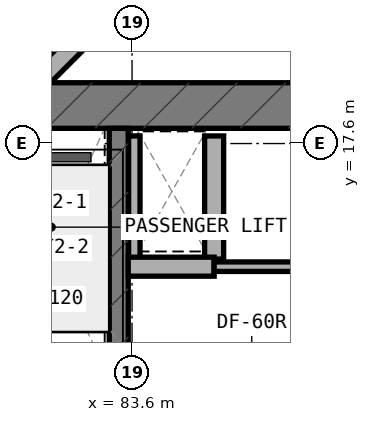
"""IFC4 building model, lengths in metres.
Left out: names, types, materials, properties, quantities, classifications, styles, units other than length and angle.
Written with IfcOpenShell. Run it as: python <this file> out.ifc"""

import sys

from ifc_helpers import new_model, si_unit, direction, frame, frame_2d, origin, place, context, subcontext, project, spatial, rectangle, extrude, element, save


model = new_model("IFC4")
c1 = context("Model", 3, precision=1e-05, world=origin(), true_north=direction((0.0, 1.0)))
c2 = subcontext(c1, "Body", "Model", "MODEL_VIEW")
j1 = project(units=[si_unit("LENGTHUNIT", "METRE"), si_unit("PLANEANGLEUNIT", "RADIAN")], contexts=[c1])
p1 = place(None, origin())
s1 = spatial("IfcSite", under=j1, at=p1, CompositionType="ELEMENT")
p2 = place(p1, origin())
s2 = spatial("IfcBuilding", under=s1, at=p2, CompositionType="ELEMENT")
p3 = place(p2, frame((0.0, 0.0, 41.5)))
s3 = spatial("IfcBuildingStorey", under=s2, at=p3, CompositionType="ELEMENT", Elevation=41.5)
p4 = place(p3, frame((67.8, 18.1, 0.0), z_axis=(0.0, 0.0, 1.0), x_axis=(1.0, 0.0, 0.0)))
e1 = element("IfcWall", 1, at=p4, inside=s3, PredefinedType="SHEAR", context=c2, shape_type="SweptSolid", body=[
    extrude(rectangle(XDim=18.6, YDim=0.6, at=frame_2d((9.3, 0.0))), origin(), (0.0, 0.0, 1.0), 3.5),
])
p5 = place(p3, frame((83.425, 14.64, 0.0), z_axis=(0.0, 0.0, 1.0), x_axis=(0.0, 1.0, 0.0)))
e2 = element("IfcWall", 2, at=p5, inside=s3, PredefinedType="STANDARD", context=c2, shape_type="SweptSolid", body=[
    extrude(rectangle(XDim=3.16, YDim=0.25, at=frame_2d((1.58, 0.0))), origin(), (0.0, 0.0, 1.0), 3.25),
])
p6 = place(p3, frame((82.082, 18.138, 0.0), z_axis=(0.0, 0.0, 1.0), x_axis=(0.707106781187, 0.707106781187, 0.0)))
e3 = element("IfcWall", 3, at=p6, inside=s3, PredefinedType="STANDARD", context=c2, shape_type="SweptSolid", body=[
    extrude(rectangle(XDim=2.311, YDim=0.26, at=frame_2d((1.155, 0.0))), origin(), (0.0, 0.0, 1.0), 3.25),
])
p7 = place(p3, frame((83.63, 16.08, 0.0), z_axis=(0.0, 0.0, 1.0), x_axis=(0.0, 1.0, 0.0)))
e4 = element("IfcWall", 4, at=p7, inside=s3, PredefinedType="PARTITIONING", context=c2, shape_type="SweptSolid", body=[
    extrude(rectangle(XDim=1.62, YDim=0.15, at=frame_2d((0.81, 0.0))), origin(), (0.0, 0.0, 1.0), 2.725),
])
p8 = place(p3, frame((84.68, 16.08, 0.0), z_axis=(0.0, 0.0, 1.0), x_axis=(0.0, 1.0, 0.0)))
e5 = element("IfcWall", 5, at=p8, inside=s3, PredefinedType="SOLIDWALL", context=c2, shape_type="SweptSolid", body=[
    extrude(rectangle(XDim=1.62, YDim=0.25, at=frame_2d((0.81, 0.0))), origin(), (0.0, 0.0, 1.0), 3.22),
])
p9 = place(p3, frame((83.55, 15.98, 0.0), z_axis=(0.0, 0.0, 1.0), x_axis=(1.0, 0.0, 0.0)))
e6 = element("IfcWall", 6, at=p9, inside=s3, PredefinedType="SOLIDWALL", context=c2, shape_type="SweptSolid", body=[
    extrude(rectangle(XDim=1.13, YDim=0.25, at=frame_2d((0.565, 0.0))), origin(), (0.0, 0.0, 1.0), 3.22),
])
p10 = place(p3, frame((84.68, 15.98, 0.0), z_axis=(0.0, 0.0, 1.0), x_axis=(1.0, 0.0, 0.0)))
e7 = element("IfcWall", 7, at=p10, inside=s3, PredefinedType="PARTITIONING", context=c2, shape_type="SweptSolid", body=[
    extrude(rectangle(XDim=1.12, YDim=0.125, at=frame_2d((0.56, 0.0))), origin(), (0.0, 0.0, 1.0), 3.22),
])
save(model, sys.argv[1])
